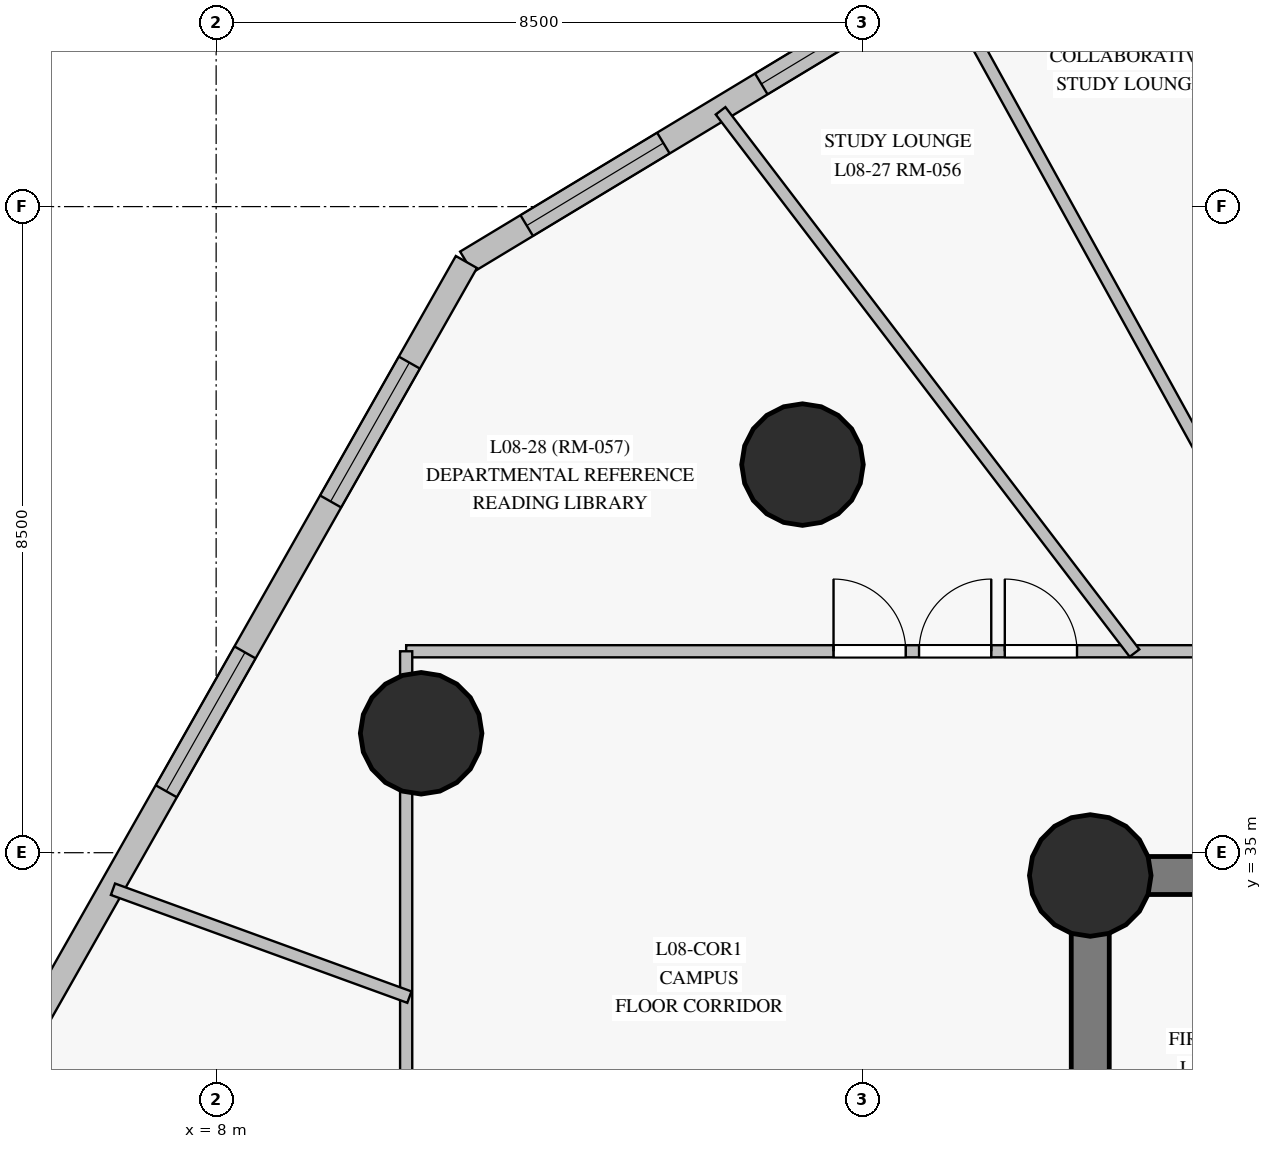
"""IFC4 building model, lengths in metres.
Left out: names, types, materials, properties, quantities, classifications, styles, units other than length and angle.
Written with IfcOpenShell. Run it as: python <this file> out.ifc"""

import sys

from ifc_helpers import new_model, si_unit, direction, frame, frame_2d, origin, origin_with_axes, origin_2d, place, context, subcontext, project, spatial, rectangle, circle, extrude, source, transform, mapped, element, fill, save


model = new_model("IFC4")
c1 = context("Model", 3, precision=1e-05, world=origin(), true_north=direction((0.0, 1.0)))
c2 = subcontext(c1, "Body", "Model", "MODEL_VIEW")
j1 = project(units=[si_unit("LENGTHUNIT", "METRE"), si_unit("PLANEANGLEUNIT", "RADIAN")], contexts=[c1])
p1 = place(None, origin())
s1 = spatial("IfcSite", under=j1, at=p1, CompositionType="ELEMENT")
p2 = place(p1, origin())
s2 = spatial("IfcBuilding", under=s1, at=p2, CompositionType="ELEMENT")
p3 = place(p2, frame((0.0, 0.0, 33.7)))
s3 = spatial("IfcBuildingStorey", under=s2, at=p3, CompositionType="ELEMENT", Elevation=33.7)
p4 = place(p3, frame((26.55, 34.7, 0.0), z_axis=(0.0, 0.0, 1.0), x_axis=(-1.0, 0.0, 0.0)))
e1 = element("IfcWall", 1, at=p4, inside=s3, PredefinedType="SHEAR", context=c2, shape_type="SweptSolid", body=[
    extrude(rectangle(XDim=7.05, YDim=0.5, at=frame_2d((3.525, 0.0))), origin(), (0.0, 0.0, 1.0), 3.35),
])
p5 = place(p4, frame((4.25, 0.0, 0.0)))
e2 = element("IfcOpeningElement", 2, at=p5, cuts=e1, PredefinedType="OPENING", context=c2, shape_type="SweptSolid", body=[
    extrude(rectangle(XDim=1.1, YDim=2.15, at=frame_2d((0.55, 1.075))), frame((0.0, 0.26, 0.0), z_axis=(0.0, -1.0, 0.0), x_axis=(1.0, 0.0, 0.0)), (0.0, 0.0, 1.0), 0.52),
])
p6 = place(p3, frame((19.5, 34.7, 0.0), z_axis=(0.0, 0.0, 1.0), x_axis=(0.0, -1.0, 0.0)))
e3 = element("IfcWall", 3, at=p6, inside=s3, PredefinedType="SHEAR", context=c2, shape_type="SweptSolid", body=[
    extrude(rectangle(XDim=16.4, YDim=0.5, at=frame_2d((8.2, 0.0))), origin(), (0.0, 0.0, 1.0), 3.35),
])
p7 = place(p6, frame((3.1, 0.0, 0.0)))
e4 = element("IfcOpeningElement", 4, at=p7, cuts=e3, PredefinedType="OPENING", context=c2, shape_type="SweptSolid", body=[
    extrude(rectangle(XDim=1.1, YDim=2.15, at=frame_2d((0.55, 1.075))), frame((0.0, 0.26, 0.0), z_axis=(0.0, -1.0, 0.0), x_axis=(1.0, 0.0, 0.0)), (0.0, 0.0, 1.0), 0.52),
])
m1 = source(origin_with_axes(), c2, "Body", "SweptSolid", [
    extrude(circle(Radius=0.8, at=origin_2d()), origin(), (0.0, 0.0, 1.0), 3.6),
])
for number, where, z_axis, x_axis in (
    (5, (19.5, 34.7, 0.0), (0.0, 0.0, 1.0), (1.0, 0.0, 0.0)),
    (6, (15.714, 40.106, 0.0), (0.0, 0.0, 1.0), (1.0, 0.0, 0.0)),
    (7, (10.697, 36.571, 0.0), (0.0, 0.0, 1.0), (1.0, 0.0, 0.0)),
):
    element("IfcColumn", number, at=place(p3, frame(where, z_axis=z_axis, x_axis=x_axis)), inside=s3, PredefinedType="COLUMN", context=c2, shape_type="MappedRepresentation", body=[
        mapped(m1, transform((0.0, 0.0, 0.0), scale=1.0)),
    ])
p8 = place(p3, frame((22.116, 49.306, 0.0), z_axis=(0.0, 0.0, 1.0), x_axis=(-0.856078953707, -0.516845068681, 0.0)))
e8 = element("IfcWall", 8, at=p8, inside=s3, PredefinedType="SOLIDWALL", context=c2, shape_type="SweptSolid", body=[
    extrude(rectangle(XDim=12.643, YDim=0.32, at=frame_2d((6.322, 0.0))), origin(), (0.0, 0.0, 1.0), 3.35),
])
p9 = place(p8, frame((2.286, 0.0, 0.85)))
e9 = element("IfcOpeningElement", 9, at=p9, cuts=e8, PredefinedType="OPENING", context=c2, shape_type="SweptSolid", body=[
    extrude(rectangle(XDim=2.1, YDim=1.95, at=frame_2d((1.05, 0.975))), frame((0.0, 0.17, 0.0), z_axis=(0.0, -1.0, 0.0), x_axis=(1.0, 0.0, 0.0)), (0.0, 0.0, 1.0), 0.34),
])
p10 = place(p8, frame((6.011, 0.0, 0.85)))
e10 = element("IfcOpeningElement", 10, at=p10, cuts=e8, PredefinedType="OPENING", context=c2, shape_type="SweptSolid", body=[
    extrude(rectangle(XDim=2.1, YDim=1.95, at=frame_2d((1.05, 0.975))), frame((0.0, 0.17, 0.0), z_axis=(0.0, -1.0, 0.0), x_axis=(1.0, 0.0, 0.0)), (0.0, 0.0, 1.0), 0.34),
])
p11 = place(p8, frame((9.616, 0.0, 0.85)))
e11 = element("IfcOpeningElement", 11, at=p11, cuts=e8, PredefinedType="OPENING", context=c2, shape_type="SweptSolid", body=[
    extrude(rectangle(XDim=2.1, YDim=1.95, at=frame_2d((1.05, 0.975))), frame((0.0, 0.17, 0.0), z_axis=(0.0, -1.0, 0.0), x_axis=(1.0, 0.0, 0.0)), (0.0, 0.0, 1.0), 0.34),
])
p12 = place(p3, frame((11.292, 42.771, 0.0), z_axis=(0.0, 0.0, 1.0), x_axis=(-0.493295954428, -0.869861541479, 0.0)))
e12 = element("IfcWall", 12, at=p12, inside=s3, PredefinedType="SOLIDWALL", context=c2, shape_type="SweptSolid", body=[
    extrude(rectangle(XDim=15.736, YDim=0.32, at=frame_2d((7.868, 0.0))), origin(), (0.0, 0.0, 1.0), 3.35),
])
p13 = place(p12, frame((1.521, 0.0, 0.85)))
e13 = element("IfcOpeningElement", 13, at=p13, cuts=e12, PredefinedType="OPENING", context=c2, shape_type="SweptSolid", body=[
    extrude(rectangle(XDim=2.1, YDim=1.95, at=frame_2d((1.05, 0.975))), frame((0.0, 0.17, 0.0), z_axis=(0.0, -1.0, 0.0), x_axis=(1.0, 0.0, 0.0)), (0.0, 0.0, 1.0), 0.34),
])
p14 = place(p12, frame((5.905, 0.0, 0.85)))
e14 = element("IfcOpeningElement", 14, at=p14, cuts=e12, PredefinedType="OPENING", context=c2, shape_type="SweptSolid", body=[
    extrude(rectangle(XDim=2.1, YDim=1.95, at=frame_2d((1.05, 0.975))), frame((0.0, 0.17, 0.0), z_axis=(0.0, -1.0, 0.0), x_axis=(1.0, 0.0, 0.0)), (0.0, 0.0, 1.0), 0.34),
])
p15 = place(p12, frame((11.521, 0.0, 0.85)))
e15 = element("IfcOpeningElement", 15, at=p15, cuts=e12, PredefinedType="OPENING", context=c2, shape_type="SweptSolid", body=[
    extrude(rectangle(XDim=2.1, YDim=1.95, at=frame_2d((1.05, 0.975))), frame((0.0, 0.17, 0.0), z_axis=(0.0, -1.0, 0.0), x_axis=(1.0, 0.0, 0.0)), (0.0, 0.0, 1.0), 0.34),
])
p16 = place(p3, frame((10.5, 37.65, 0.0), z_axis=(0.0, 0.0, 1.0), x_axis=(1.0, 0.0, 0.0)))
e16 = element("IfcWall", 16, at=p16, inside=s3, PredefinedType="PARTITIONING", context=c2, shape_type="SweptSolid", body=[
    extrude(rectangle(XDim=29.75, YDim=0.16, at=frame_2d((14.875, 0.0))), origin(), (0.0, 0.0, 1.0), 2.75),
])
p17 = place(p16, frame((28.008, 0.0, 0.0)))
e17 = element("IfcOpeningElement", 17, at=p17, cuts=e16, PredefinedType="OPENING", context=c2, shape_type="SweptSolid", body=[
    extrude(rectangle(XDim=0.95, YDim=2.15, at=frame_2d((0.475, 1.075))), frame((0.0, 0.09, 0.0), z_axis=(0.0, -1.0, 0.0), x_axis=(1.0, 0.0, 0.0)), (0.0, 0.0, 1.0), 0.18),
])
p18 = place(p16, frame((25.599, 0.0, 0.0)))
e18 = element("IfcOpeningElement", 18, at=p18, cuts=e16, PredefinedType="OPENING", context=c2, shape_type="SweptSolid", body=[
    extrude(rectangle(XDim=0.95, YDim=2.15, at=frame_2d((0.475, 1.075))), frame((0.0, 0.09, 0.0), z_axis=(0.0, -1.0, 0.0), x_axis=(1.0, 0.0, 0.0)), (0.0, 0.0, 1.0), 0.18),
])
p19 = place(p16, frame((23.319, 0.0, 0.0)))
e19 = element("IfcOpeningElement", 19, at=p19, cuts=e16, PredefinedType="OPENING", context=c2, shape_type="SweptSolid", body=[
    extrude(rectangle(XDim=0.95, YDim=2.15, at=frame_2d((0.475, 1.075))), frame((0.0, 0.09, 0.0), z_axis=(0.0, -1.0, 0.0), x_axis=(1.0, 0.0, 0.0)), (0.0, 0.0, 1.0), 0.18),
])
p20 = place(p16, frame((20.597, 0.0, 0.0)))
e20 = element("IfcOpeningElement", 20, at=p20, cuts=e16, PredefinedType="OPENING", context=c2, shape_type="SweptSolid", body=[
    extrude(rectangle(XDim=0.95, YDim=2.15, at=frame_2d((0.475, 1.075))), frame((0.0, 0.09, 0.0), z_axis=(0.0, -1.0, 0.0), x_axis=(1.0, 0.0, 0.0)), (0.0, 0.0, 1.0), 0.18),
])
p21 = place(p16, frame((18.611, 0.0, 0.0)))
e21 = element("IfcOpeningElement", 21, at=p21, cuts=e16, PredefinedType="OPENING", context=c2, shape_type="SweptSolid", body=[
    extrude(rectangle(XDim=0.95, YDim=2.15, at=frame_2d((0.475, 1.075))), frame((0.0, 0.09, 0.0), z_axis=(0.0, -1.0, 0.0), x_axis=(1.0, 0.0, 0.0)), (0.0, 0.0, 1.0), 0.18),
])
p22 = place(p16, frame((16.123, 0.0, 0.0)))
e22 = element("IfcOpeningElement", 22, at=p22, cuts=e16, PredefinedType="OPENING", context=c2, shape_type="SweptSolid", body=[
    extrude(rectangle(XDim=0.95, YDim=2.15, at=frame_2d((0.475, 1.075))), frame((0.0, 0.09, 0.0), z_axis=(0.0, -1.0, 0.0), x_axis=(1.0, 0.0, 0.0)), (0.0, 0.0, 1.0), 0.18),
])
p23 = place(p16, frame((12.996, 0.0, 0.0)))
e23 = element("IfcOpeningElement", 23, at=p23, cuts=e16, PredefinedType="OPENING", context=c2, shape_type="SweptSolid", body=[
    extrude(rectangle(XDim=0.95, YDim=2.15, at=frame_2d((0.475, 1.075))), frame((0.0, 0.09, 0.0), z_axis=(0.0, -1.0, 0.0), x_axis=(1.0, 0.0, 0.0)), (0.0, 0.0, 1.0), 0.18),
])
p24 = place(p16, frame((10.46, 0.0, 0.0)))
e24 = element("IfcOpeningElement", 24, at=p24, cuts=e16, PredefinedType="OPENING", context=c2, shape_type="SweptSolid", body=[
    extrude(rectangle(XDim=0.95, YDim=2.15, at=frame_2d((0.475, 1.075))), frame((0.0, 0.09, 0.0), z_axis=(0.0, -1.0, 0.0), x_axis=(1.0, 0.0, 0.0)), (0.0, 0.0, 1.0), 0.18),
])
p25 = place(p16, frame((7.876, 0.0, 0.0)))
e25 = element("IfcOpeningElement", 25, at=p25, cuts=e16, PredefinedType="OPENING", context=c2, shape_type="SweptSolid", body=[
    extrude(rectangle(XDim=0.95, YDim=2.15, at=frame_2d((0.475, 1.075))), frame((0.0, 0.09, 0.0), z_axis=(0.0, -1.0, 0.0), x_axis=(1.0, 0.0, 0.0)), (0.0, 0.0, 1.0), 0.18),
])
p26 = place(p16, frame((6.748, 0.0, 0.0)))
e26 = element("IfcOpeningElement", 26, at=p26, cuts=e16, PredefinedType="OPENING", context=c2, shape_type="SweptSolid", body=[
    extrude(rectangle(XDim=0.95, YDim=2.15, at=frame_2d((0.475, 1.075))), frame((0.0, 0.09, 0.0), z_axis=(0.0, -1.0, 0.0), x_axis=(1.0, 0.0, 0.0)), (0.0, 0.0, 1.0), 0.18),
])
p27 = place(p16, frame((5.623, 0.0, 0.0)))
e27 = element("IfcOpeningElement", 27, at=p27, cuts=e16, PredefinedType="OPENING", context=c2, shape_type="SweptSolid", body=[
    extrude(rectangle(XDim=0.95, YDim=2.15, at=frame_2d((0.475, 1.075))), frame((0.0, 0.09, 0.0), z_axis=(0.0, -1.0, 0.0), x_axis=(1.0, 0.0, 0.0)), (0.0, 0.0, 1.0), 0.18),
])
p28 = place(p3, frame((10.5, 15.35, 0.0), z_axis=(0.0, 0.0, 1.0), x_axis=(0.0, 1.0, 0.0)))
e28 = element("IfcWall", 28, at=p28, inside=s3, PredefinedType="PARTITIONING", context=c2, shape_type="SweptSolid", body=[
    extrude(rectangle(XDim=22.3, YDim=0.16, at=frame_2d((11.15, 0.0))), origin(), (0.0, 0.0, 1.0), 2.75),
])
p29 = place(p28, frame((10.675, 0.0, 0.0)))
e29 = element("IfcOpeningElement", 29, at=p29, cuts=e28, PredefinedType="OPENING", context=c2, shape_type="SweptSolid", body=[
    extrude(rectangle(XDim=0.95, YDim=2.15, at=frame_2d((0.475, 1.075))), frame((0.0, 0.09, 0.0), z_axis=(0.0, -1.0, 0.0), x_axis=(1.0, 0.0, 0.0)), (0.0, 0.0, 1.0), 0.18),
])
p30 = place(p28, frame((4.56, 0.0, 0.0)))
e30 = element("IfcOpeningElement", 30, at=p30, cuts=e28, PredefinedType="OPENING", context=c2, shape_type="SweptSolid", body=[
    extrude(rectangle(XDim=0.96, YDim=2.15, at=frame_2d((0.48, 1.075))), frame((0.0, 0.09, 0.0), z_axis=(0.0, -1.0, 0.0), x_axis=(1.0, 0.0, 0.0)), (0.0, 0.0, 1.0), 0.18),
])
p31 = place(p28, frame((14.02, 0.0, 0.0)))
e31 = element("IfcOpeningElement", 31, at=p31, cuts=e28, PredefinedType="OPENING", context=c2, shape_type="SweptSolid", body=[
    extrude(rectangle(XDim=0.95, YDim=2.15, at=frame_2d((0.475, 1.075))), frame((0.0, 0.09, 0.0), z_axis=(0.0, -1.0, 0.0), x_axis=(1.0, 0.0, 0.0)), (0.0, 0.0, 1.0), 0.18),
])
p32 = place(p3, frame((22.432, 37.624, 0.0), z_axis=(0.0, 0.0, 1.0), x_axis=(-0.483064621036, 0.875584702872, 0.0)))
e32 = element("IfcWall", 32, at=p32, inside=s3, PredefinedType="PARTITIONING", context=c2, shape_type="SweptSolid", body=[
    extrude(rectangle(XDim=10.146, YDim=0.16, at=frame_2d((5.073, 0.0))), origin(), (0.0, 0.0, 1.0), 3.35),
])
p33 = place(p3, frame((20.082, 37.626, 0.0), z_axis=(0.0, 0.0, 1.0), x_axis=(-0.606772385427, 0.794875633218, 0.0)))
e33 = element("IfcWall", 33, at=p33, inside=s3, PredefinedType="PARTITIONING", context=c2, shape_type="SweptSolid", body=[
    extrude(rectangle(XDim=8.975, YDim=0.16, at=frame_2d((4.488, 0.0))), origin(), (0.0, 0.0, 1.0), 3.35),
])
p34 = place(p3, frame((10.542, 33.1, 0.0), z_axis=(0.0, 0.0, 1.0), x_axis=(-0.939705790412, 0.341983957908, 0.0)))
e34 = element("IfcWall", 34, at=p34, inside=s3, PredefinedType="PARTITIONING", context=c2, shape_type="SweptSolid", body=[
    extrude(rectangle(XDim=4.15, YDim=0.16, at=frame_2d((2.075, 0.0))), origin(), (0.0, 0.0, 1.0), 3.35),
])
m2 = source(origin_with_axes(), c2, "Body", "SweptSolid", [
    extrude(rectangle(XDim=2.1, YDim=1.95, at=frame_2d((1.05, 0.975))), frame((0.0, 0.03, 0.0), z_axis=(0.0, -1.0, 0.0), x_axis=(1.0, 0.0, 0.0)), (0.0, 0.0, 1.0), 0.06),
])
p35 = place(p10, origin())
e35 = element("IfcWindow", 35, at=p35, inside=s3, PartitioningType="SINGLE_PANEL", PredefinedType="WINDOW", context=c2, shape_type="MappedRepresentation", body=[
    mapped(m2, transform((0.0, 0.0, 0.0), scale=1.0)),
])
fill(e10, e35)
p36 = place(p11, origin())
e36 = element("IfcWindow", 36, at=p36, inside=s3, PartitioningType="SINGLE_PANEL", PredefinedType="WINDOW", context=c2, shape_type="MappedRepresentation", body=[
    mapped(m2, transform((0.0, 0.0, 0.0), scale=1.0)),
])
fill(e11, e36)
p37 = place(p13, origin())
e37 = element("IfcWindow", 37, at=p37, inside=s3, PartitioningType="SINGLE_PANEL", PredefinedType="WINDOW", context=c2, shape_type="MappedRepresentation", body=[
    mapped(m2, transform((0.0, 0.0, 0.0), scale=1.0)),
])
fill(e13, e37)
p38 = place(p14, origin())
e38 = element("IfcWindow", 38, at=p38, inside=s3, PartitioningType="SINGLE_PANEL", PredefinedType="WINDOW", context=c2, shape_type="MappedRepresentation", body=[
    mapped(m2, transform((0.0, 0.0, 0.0), scale=1.0)),
])
fill(e14, e38)
m3 = source(origin_with_axes(), c2, "Body", "SweptSolid", [
    extrude(rectangle(XDim=0.95, YDim=2.15, at=frame_2d((0.475, 1.075))), frame((0.0, 0.025, 0.0), z_axis=(0.0, -1.0, 0.0), x_axis=(1.0, 0.0, 0.0)), (0.0, 0.0, 1.0), 0.05),
])
p39 = place(p25, origin())
e39 = element("IfcDoor", 39, at=p39, inside=s3, OperationType="SINGLE_SWING_LEFT", PredefinedType="DOOR", context=c2, shape_type="MappedRepresentation", body=[
    mapped(m3, transform((0.0, 0.0, 0.0), scale=1.0)),
])
fill(e25, e39)
p40 = place(p26, origin())
e40 = element("IfcDoor", 40, at=p40, inside=s3, OperationType="SINGLE_SWING_RIGHT", PredefinedType="DOOR", context=c2, shape_type="MappedRepresentation", body=[
    mapped(m3, transform((0.0, 0.0, 0.0), scale=1.0)),
])
fill(e26, e40)
p41 = place(p27, origin())
e41 = element("IfcDoor", 41, at=p41, inside=s3, OperationType="SINGLE_SWING_LEFT", PredefinedType="DOOR", context=c2, shape_type="MappedRepresentation", body=[
    mapped(m3, transform((0.0, 0.0, 0.0), scale=1.0)),
])
fill(e27, e41)
save(model, sys.argv[1])
